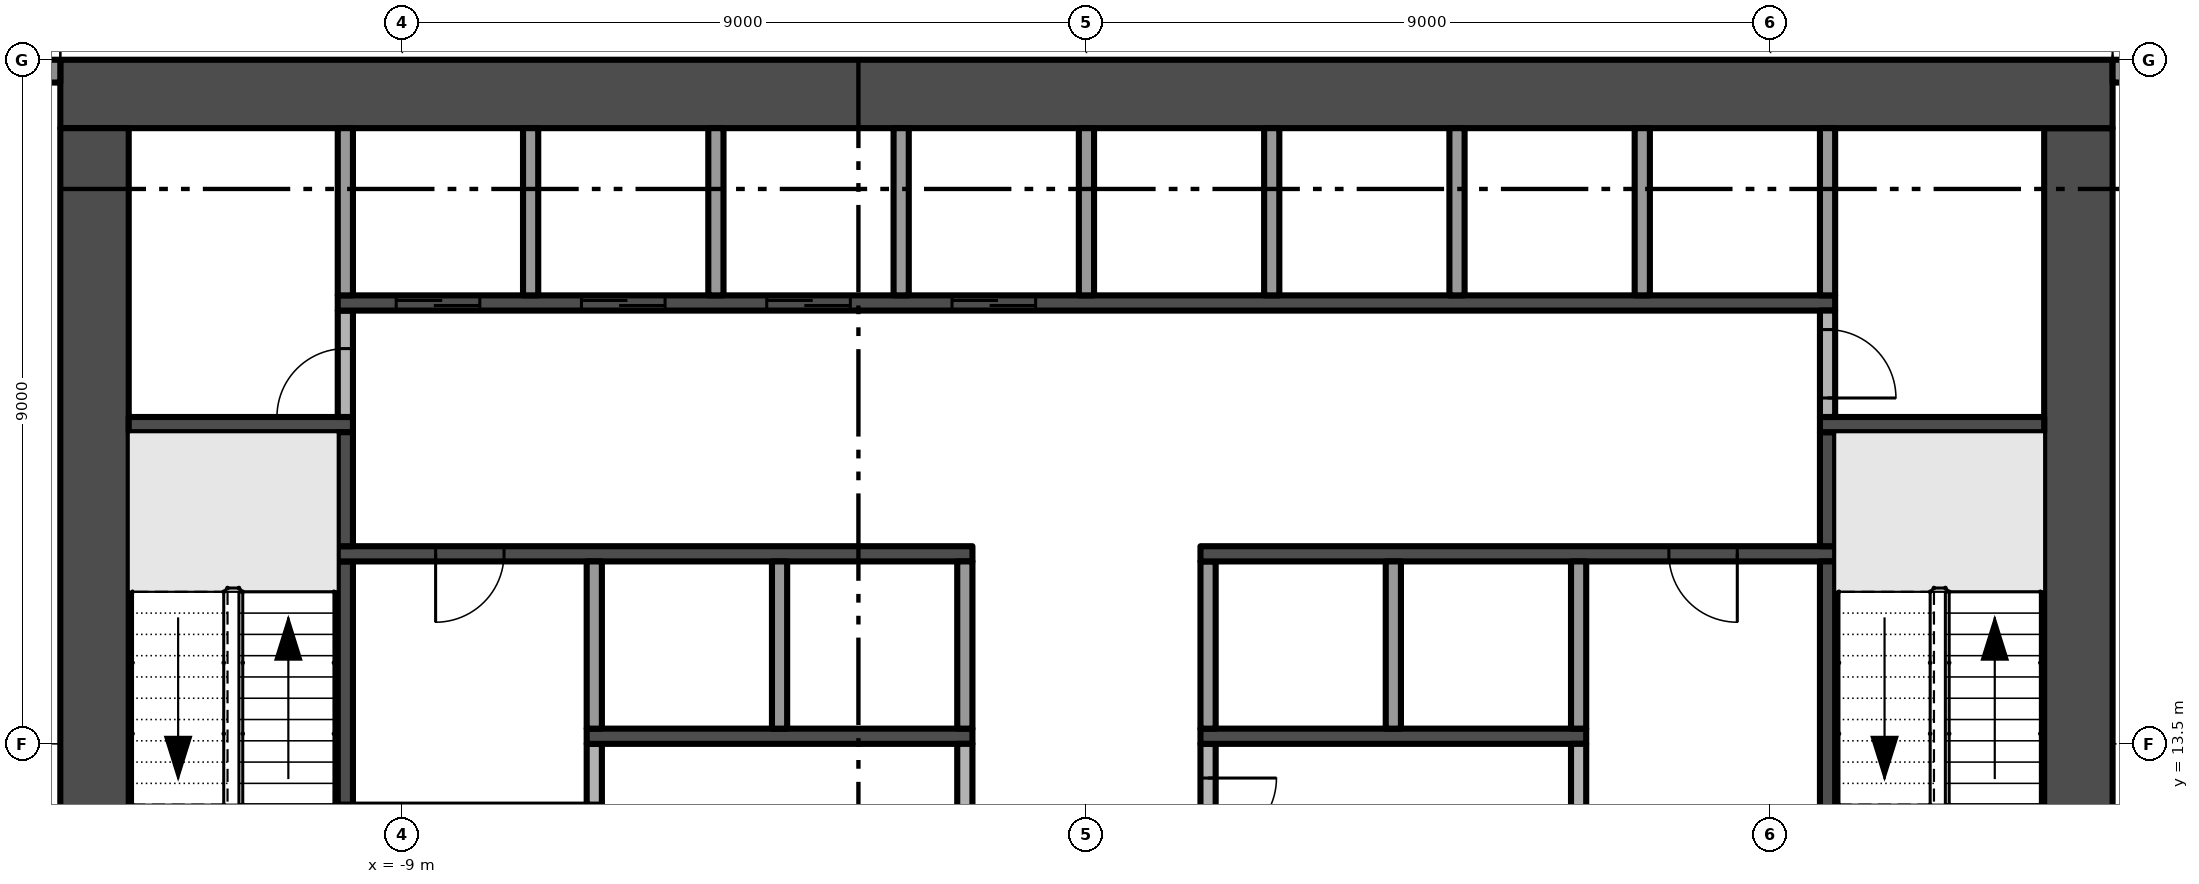
"""IFC4 building model, lengths in metres.
Left out: names, types, materials, properties, quantities, classifications, styles, units other than length and angle.
Written with IfcOpenShell. Run it as: python <this file> out.ifc"""

import sys

from ifc_helpers import new_model, si_unit, direction, frame, frame_2d, origin, place, context, subcontext, project, spatial, rectangle, extrude, element, fill, save


model = new_model("IFC4")
c1 = context("Model", 3, precision=1e-05, world=origin(), true_north=direction((0.0, 1.0)))
c2 = subcontext(c1, "Body", "Model", "MODEL_VIEW")
j1 = project(units=[si_unit("LENGTHUNIT", "METRE"), si_unit("PLANEANGLEUNIT", "RADIAN")], contexts=[c1])
p1 = place(None, origin())
s1 = spatial("IfcSite", under=j1, at=p1, CompositionType="ELEMENT")
p2 = place(p1, origin())
s2 = spatial("IfcBuilding", under=s1, at=p2, CompositionType="ELEMENT")
p3 = place(p2, frame((0.0, 0.0, 18.8)))
s3 = spatial("IfcBuildingStorey", under=s2, at=p3, CompositionType="ELEMENT", Elevation=18.8)
p4 = place(p3, frame((13.05, 5.4, -0.3), z_axis=(0.0, 0.0, 1.0), x_axis=(0.0, 1.0, 0.0)))
e1 = element("IfcWall", 1, at=p4, inside=s3, PredefinedType="SHEAR", context=c2, shape_type="SweptSolid", body=[
    extrude(rectangle(XDim=16.2, YDim=0.9, at=frame_2d((8.1, 0.0))), origin(), (0.0, 0.0, 1.0), 3.8),
])
p5 = place(p4, frame((6.0, 0.0, 0.3)))
e2 = element("IfcOpeningElement", 2, at=p5, cuts=e1, PredefinedType="OPENING", context=c2, shape_type="SweptSolid", body=[
    extrude(rectangle(XDim=1.2, YDim=2.2, at=frame_2d((0.6, 1.1))), frame((0.0, 0.46, 0.0), z_axis=(0.0, -1.0, 0.0), x_axis=(1.0, 0.0, 0.0)), (0.0, 0.0, 1.0), 0.92),
])
p6 = place(p3, frame((13.5, 22.05, -0.3), z_axis=(0.0, 0.0, 1.0), x_axis=(-1.0, 0.0, 0.0)))
e3 = element("IfcWall", 3, at=p6, inside=s3, PredefinedType="SHEAR", context=c2, shape_type="SweptSolid", body=[
    extrude(rectangle(XDim=27.0, YDim=0.9, at=frame_2d((13.5, 0.0))), origin(), (0.0, 0.0, 1.0), 3.8),
])
p7 = place(p3, frame((-13.05, 21.6, -0.3), z_axis=(0.0, 0.0, 1.0), x_axis=(0.0, -1.0, 0.0)))
e4 = element("IfcWall", 4, at=p7, inside=s3, PredefinedType="SHEAR", context=c2, shape_type="SweptSolid", body=[
    extrude(rectangle(XDim=16.2, YDim=0.9, at=frame_2d((8.1, 0.0))), origin(), (0.0, 0.0, 1.0), 3.8),
])
p8 = place(p7, frame((9.0, 0.0, 0.3)))
e5 = element("IfcOpeningElement", 5, at=p8, cuts=e4, PredefinedType="OPENING", context=c2, shape_type="SweptSolid", body=[
    extrude(rectangle(XDim=1.2, YDim=2.2, at=frame_2d((0.6, 1.1))), frame((0.0, 0.46, 0.0), z_axis=(0.0, -1.0, 0.0), x_axis=(1.0, 0.0, 0.0)), (0.0, 0.0, 1.0), 0.92),
])
p9 = place(p3, frame((13.5, 22.35, 0.0), z_axis=(0.0, 0.0, 1.0), x_axis=(1.0, 0.0, 0.0)))
e6 = element("IfcWall", 6, at=p9, inside=s3, PredefinedType="SOLIDWALL", context=c2, shape_type="SweptSolid", body=[
    extrude(rectangle(XDim=3.75, YDim=0.3, at=frame_2d((1.875, 0.0))), origin(), (0.0, 0.0, 1.0), 3.5),
])
p10 = place(p9, frame((0.85, 0.0, 0.45)))
e7 = element("IfcOpeningElement", 7, at=p10, cuts=e6, PredefinedType="OPENING", context=c2, shape_type="SweptSolid", body=[
    extrude(rectangle(XDim=2.6, YDim=2.65, at=frame_2d((1.3, 1.325))), frame((0.0, 0.16, 0.0), z_axis=(0.0, -1.0, 0.0), x_axis=(1.0, 0.0, 0.0)), (0.0, 0.0, 1.0), 0.32),
])
p11 = place(p3, frame((-17.25, 22.35, 0.0), z_axis=(0.0, 0.0, 1.0), x_axis=(1.0, 0.0, 0.0)))
e8 = element("IfcWall", 8, at=p11, inside=s3, PredefinedType="SOLIDWALL", context=c2, shape_type="SweptSolid", body=[
    extrude(rectangle(XDim=3.75, YDim=0.3, at=frame_2d((1.875, 0.0))), origin(), (0.0, 0.0, 1.0), 3.5),
])
p12 = place(p11, frame((0.3, 0.0, 0.0)))
e9 = element("IfcOpeningElement", 9, at=p12, cuts=e8, PredefinedType="OPENING", context=c2, shape_type="SweptSolid", body=[
    extrude(rectangle(XDim=2.6, YDim=2.4, at=frame_2d((1.3, 1.2))), frame((0.0, 0.16, 0.0), z_axis=(0.0, -1.0, 0.0), x_axis=(1.0, 0.0, 0.0)), (0.0, 0.0, 1.0), 0.32),
])
p13 = place(p3, frame((-12.6, 17.7, 0.0), z_axis=(0.0, 0.0, 1.0), x_axis=(1.0, 0.0, 0.0)))
e10 = element("IfcWall", 10, at=p13, inside=s3, PredefinedType="SHEAR", context=c2, shape_type="SweptSolid", body=[
    extrude(rectangle(XDim=2.95, YDim=0.2, at=frame_2d((1.475, 0.0))), origin(), (0.0, 0.0, 1.0), 3.5),
])
p14 = place(p3, frame((-9.75, 12.7, 0.0), z_axis=(0.0, 0.0, 1.0), x_axis=(0.0, 1.0, 0.0)))
e11 = element("IfcWall", 11, at=p14, inside=s3, PredefinedType="SHEAR", context=c2, shape_type="SweptSolid", body=[
    extrude(rectangle(XDim=3.2, YDim=0.2, at=frame_2d((1.6, 0.0))), origin(), (0.0, 0.0, 1.0), 3.5),
])
p15 = place(p3, frame((-1.5, 16.0, 0.0), z_axis=(0.0, 0.0, 1.0), x_axis=(-1.0, 0.0, 0.0)))
e12 = element("IfcWall", 12, at=p15, inside=s3, PredefinedType="SHEAR", context=c2, shape_type="SweptSolid", body=[
    extrude(rectangle(XDim=8.35, YDim=0.2, at=frame_2d((4.175, 0.0))), origin(), (0.0, 0.0, 1.0), 3.5),
])
p16 = place(p15, frame((6.162, 0.0, 0.0)))
e13 = element("IfcOpeningElement", 13, at=p16, cuts=e12, PredefinedType="OPENING", context=c2, shape_type="SweptSolid", body=[
    extrude(rectangle(XDim=0.9, YDim=2.1, at=frame_2d((0.45, 1.05))), frame((0.0, 0.11, 0.0), z_axis=(0.0, -1.0, 0.0), x_axis=(1.0, 0.0, 0.0)), (0.0, 0.0, 1.0), 0.22),
])
p17 = place(p3, frame((-9.75, 16.1, 0.0), z_axis=(0.0, 0.0, 1.0), x_axis=(0.0, 1.0, 0.0)))
e14 = element("IfcWall", 14, at=p17, inside=s3, PredefinedType="SHEAR", context=c2, shape_type="SweptSolid", body=[
    extrude(rectangle(XDim=1.5, YDim=0.2, at=frame_2d((0.75, 0.0))), origin(), (0.0, 0.0, 1.0), 3.5),
])
p18 = place(p3, frame((-9.75, 17.8, 0.0), z_axis=(0.0, 0.0, 1.0), x_axis=(0.0, 1.0, 0.0)))
e15 = element("IfcWall", 15, at=p18, inside=s3, PredefinedType="PARTITIONING", context=c2, shape_type="SweptSolid", body=[
    extrude(rectangle(XDim=1.4, YDim=0.2, at=frame_2d((0.7, 0.0))), origin(), (0.0, 0.0, 1.0), 3.5),
])
p19 = place(p18, origin())
e16 = element("IfcOpeningElement", 16, at=p19, cuts=e15, PredefinedType="OPENING", context=c2, shape_type="SweptSolid", body=[
    extrude(rectangle(XDim=0.9, YDim=2.1, at=frame_2d((0.45, 1.05))), frame((0.0, 0.11, 0.0), z_axis=(0.0, -1.0, 0.0), x_axis=(1.0, 0.0, 0.0)), (0.0, 0.0, 1.0), 0.22),
])
p20 = place(p3, frame((-9.85, 19.3, 0.0), z_axis=(0.0, 0.0, 1.0), x_axis=(1.0, 0.0, 0.0)))
e17 = element("IfcWall", 17, at=p20, inside=s3, PredefinedType="SHEAR", context=c2, shape_type="SweptSolid", body=[
    extrude(rectangle(XDim=19.7, YDim=0.2, at=frame_2d((9.85, 0.0))), origin(), (0.0, 0.0, 1.0), 3.5),
])
p21 = place(p20, frame((0.769, 0.0, 0.0)))
e18 = element("IfcOpeningElement", 18, at=p21, cuts=e17, PredefinedType="OPENING", context=c2, shape_type="SweptSolid", body=[
    extrude(rectangle(XDim=1.1, YDim=2.1, at=frame_2d((0.55, 1.05))), frame((0.0, 0.11, 0.0), z_axis=(0.0, -1.0, 0.0), x_axis=(1.0, 0.0, 0.0)), (0.0, 0.0, 1.0), 0.22),
])
p22 = place(p20, frame((3.206, 0.0, 0.0)))
e19 = element("IfcOpeningElement", 19, at=p22, cuts=e17, PredefinedType="OPENING", context=c2, shape_type="SweptSolid", body=[
    extrude(rectangle(XDim=1.1, YDim=2.1, at=frame_2d((0.55, 1.05))), frame((0.0, 0.11, 0.0), z_axis=(0.0, -1.0, 0.0), x_axis=(1.0, 0.0, 0.0)), (0.0, 0.0, 1.0), 0.22),
])
p23 = place(p20, frame((5.644, 0.0, 0.0)))
e20 = element("IfcOpeningElement", 20, at=p23, cuts=e17, PredefinedType="OPENING", context=c2, shape_type="SweptSolid", body=[
    extrude(rectangle(XDim=1.1, YDim=2.1, at=frame_2d((0.55, 1.05))), frame((0.0, 0.11, 0.0), z_axis=(0.0, -1.0, 0.0), x_axis=(1.0, 0.0, 0.0)), (0.0, 0.0, 1.0), 0.22),
])
p24 = place(p20, frame((8.081, 0.0, 0.0)))
e21 = element("IfcOpeningElement", 21, at=p24, cuts=e17, PredefinedType="OPENING", context=c2, shape_type="SweptSolid", body=[
    extrude(rectangle(XDim=1.1, YDim=2.1, at=frame_2d((0.55, 1.05))), frame((0.0, 0.11, 0.0), z_axis=(0.0, -1.0, 0.0), x_axis=(1.0, 0.0, 0.0)), (0.0, 0.0, 1.0), 0.22),
])
for number, where, z_axis, x_axis in (
    (22, (-9.75, 19.4, 0.0), (0.0, 0.0, 1.0), (0.0, 1.0, 0.0)),
    (23, (-7.312, 19.4, 0.0), (0.0, 0.0, 1.0), (0.0, 1.0, 0.0)),
):
    element("IfcWall", number, at=place(p3, frame(where, z_axis=z_axis, x_axis=x_axis)), inside=s3, PredefinedType="PARTITIONING", context=c2, shape_type="SweptSolid", body=[
        extrude(rectangle(XDim=2.2, YDim=0.2, at=frame_2d((1.1, 0.0))), origin(), (0.0, 0.0, 1.0), 3.5),
    ])
p25 = place(p3, frame((-6.475, 12.7, 0.0), z_axis=(0.0, 0.0, 1.0), x_axis=(0.0, 1.0, 0.0)))
e24 = element("IfcWall", 24, at=p25, inside=s3, PredefinedType="PARTITIONING", context=c2, shape_type="SweptSolid", body=[
    extrude(rectangle(XDim=0.8, YDim=0.2, at=frame_2d((0.4, 0.0))), origin(), (0.0, 0.0, 1.0), 3.5),
])
p26 = place(p3, frame((-6.575, 13.6, 0.0), z_axis=(0.0, 0.0, 1.0), x_axis=(1.0, 0.0, 0.0)))
e25 = element("IfcWall", 25, at=p26, inside=s3, PredefinedType="SHEAR", context=c2, shape_type="SweptSolid", body=[
    extrude(rectangle(XDim=5.075, YDim=0.2, at=frame_2d((2.538, 0.0))), origin(), (0.0, 0.0, 1.0), 3.5),
])
for number, where, z_axis, x_axis in (
    (26, (-6.475, 13.7, 0.0), (0.0, 0.0, 1.0), (0.0, 1.0, 0.0)),
    (27, (-4.875, 19.4, 0.0), (0.0, 0.0, 1.0), (0.0, 1.0, 0.0)),
    (28, (-4.037, 13.7, 0.0), (0.0, 0.0, 1.0), (0.0, 1.0, 0.0)),
    (29, (-2.438, 19.4, 0.0), (0.0, 0.0, 1.0), (0.0, 1.0, 0.0)),
):
    element("IfcWall", number, at=place(p3, frame(where, z_axis=z_axis, x_axis=x_axis)), inside=s3, PredefinedType="PARTITIONING", context=c2, shape_type="SweptSolid", body=[
        extrude(rectangle(XDim=2.2, YDim=0.2, at=frame_2d((1.1, 0.0))), origin(), (0.0, 0.0, 1.0), 3.5),
    ])
p27 = place(p3, frame((-1.6, 10.5, 0.0), z_axis=(0.0, 0.0, 1.0), x_axis=(0.0, 1.0, 0.0)))
e30 = element("IfcWall", 30, at=p27, inside=s3, PredefinedType="PARTITIONING", context=c2, shape_type="SweptSolid", body=[
    extrude(rectangle(XDim=3.0, YDim=0.2, at=frame_2d((1.5, 0.0))), origin(), (0.0, 0.0, 1.0), 3.5),
])
p28 = place(p27, frame((1.05, 0.0, 0.0)))
e31 = element("IfcOpeningElement", 31, at=p28, cuts=e30, PredefinedType="OPENING", context=c2, shape_type="SweptSolid", body=[
    extrude(rectangle(XDim=0.9, YDim=2.1, at=frame_2d((0.45, 1.05))), frame((0.0, 0.11, 0.0), z_axis=(0.0, -1.0, 0.0), x_axis=(1.0, 0.0, 0.0)), (0.0, 0.0, 1.0), 0.22),
])
for number, where, z_axis, x_axis in (
    (32, (-1.6, 13.7, 0.0), (0.0, 0.0, 1.0), (0.0, 1.0, 0.0)),
    (33, (0.0, 19.4, 0.0), (0.0, 0.0, 1.0), (0.0, 1.0, 0.0)),
):
    element("IfcWall", number, at=place(p3, frame(where, z_axis=z_axis, x_axis=x_axis)), inside=s3, PredefinedType="PARTITIONING", context=c2, shape_type="SweptSolid", body=[
        extrude(rectangle(XDim=2.2, YDim=0.2, at=frame_2d((1.1, 0.0))), origin(), (0.0, 0.0, 1.0), 3.5),
    ])
p29 = place(p3, frame((1.6, 13.5, 0.0), z_axis=(0.0, 0.0, 1.0), x_axis=(0.0, -1.0, 0.0)))
e34 = element("IfcWall", 34, at=p29, inside=s3, PredefinedType="PARTITIONING", context=c2, shape_type="SweptSolid", body=[
    extrude(rectangle(XDim=1.8, YDim=0.2, at=frame_2d((0.9, 0.0))), origin(), (0.0, 0.0, 1.0), 3.5),
])
p30 = place(p29, frame((0.45, 0.0, 0.0)))
e35 = element("IfcOpeningElement", 35, at=p30, cuts=e34, PredefinedType="OPENING", context=c2, shape_type="SweptSolid", body=[
    extrude(rectangle(XDim=0.9, YDim=2.1, at=frame_2d((0.45, 1.05))), frame((0.0, 0.11, 0.0), z_axis=(0.0, -1.0, 0.0), x_axis=(1.0, 0.0, 0.0)), (0.0, 0.0, 1.0), 0.22),
])
p31 = place(p3, frame((1.5, 13.6, 0.0), z_axis=(0.0, 0.0, 1.0), x_axis=(1.0, 0.0, 0.0)))
e36 = element("IfcWall", 36, at=p31, inside=s3, PredefinedType="SHEAR", context=c2, shape_type="SweptSolid", body=[
    extrude(rectangle(XDim=5.075, YDim=0.2, at=frame_2d((2.538, 0.0))), origin(), (0.0, 0.0, 1.0), 3.5),
])
p32 = place(p3, frame((1.6, 13.7, 0.0), z_axis=(0.0, 0.0, 1.0), x_axis=(0.0, 1.0, 0.0)))
e37 = element("IfcWall", 37, at=p32, inside=s3, PredefinedType="PARTITIONING", context=c2, shape_type="SweptSolid", body=[
    extrude(rectangle(XDim=2.2, YDim=0.2, at=frame_2d((1.1, 0.0))), origin(), (0.0, 0.0, 1.0), 3.5),
])
p33 = place(p3, frame((9.85, 16.0, 0.0), z_axis=(0.0, 0.0, 1.0), x_axis=(-1.0, 0.0, 0.0)))
e38 = element("IfcWall", 38, at=p33, inside=s3, PredefinedType="SHEAR", context=c2, shape_type="SweptSolid", body=[
    extrude(rectangle(XDim=8.35, YDim=0.2, at=frame_2d((4.175, 0.0))), origin(), (0.0, 0.0, 1.0), 3.5),
])
p34 = place(p33, frame((1.288, 0.0, 0.0)))
e39 = element("IfcOpeningElement", 39, at=p34, cuts=e38, PredefinedType="OPENING", context=c2, shape_type="SweptSolid", body=[
    extrude(rectangle(XDim=0.9, YDim=2.1, at=frame_2d((0.45, 1.05))), frame((0.0, 0.11, 0.0), z_axis=(0.0, -1.0, 0.0), x_axis=(1.0, 0.0, 0.0)), (0.0, 0.0, 1.0), 0.22),
])
for number, where, z_axis, x_axis in (
    (40, (2.438, 19.4, 0.0), (0.0, 0.0, 1.0), (0.0, 1.0, 0.0)),
    (41, (4.037, 13.7, 0.0), (0.0, 0.0, 1.0), (0.0, 1.0, 0.0)),
    (42, (4.875, 19.4, 0.0), (0.0, 0.0, 1.0), (0.0, 1.0, 0.0)),
):
    element("IfcWall", number, at=place(p3, frame(where, z_axis=z_axis, x_axis=x_axis)), inside=s3, PredefinedType="PARTITIONING", context=c2, shape_type="SweptSolid", body=[
        extrude(rectangle(XDim=2.2, YDim=0.2, at=frame_2d((1.1, 0.0))), origin(), (0.0, 0.0, 1.0), 3.5),
    ])
p35 = place(p3, frame((6.475, 12.3, 0.0), z_axis=(0.0, 0.0, 1.0), x_axis=(0.0, 1.0, 0.0)))
e43 = element("IfcWall", 43, at=p35, inside=s3, PredefinedType="PARTITIONING", context=c2, shape_type="SweptSolid", body=[
    extrude(rectangle(XDim=1.2, YDim=0.2, at=frame_2d((0.6, 0.0))), origin(), (0.0, 0.0, 1.0), 3.5),
])
for number, where, z_axis, x_axis in (
    (44, (6.475, 13.7, 0.0), (0.0, 0.0, 1.0), (0.0, 1.0, 0.0)),
    (45, (7.312, 19.4, 0.0), (0.0, 0.0, 1.0), (0.0, 1.0, 0.0)),
):
    element("IfcWall", number, at=place(p3, frame(where, z_axis=z_axis, x_axis=x_axis)), inside=s3, PredefinedType="PARTITIONING", context=c2, shape_type="SweptSolid", body=[
        extrude(rectangle(XDim=2.2, YDim=0.2, at=frame_2d((1.1, 0.0))), origin(), (0.0, 0.0, 1.0), 3.5),
    ])
p36 = place(p3, frame((9.75, 12.3, 0.0), z_axis=(0.0, 0.0, 1.0), x_axis=(0.0, 1.0, 0.0)))
e46 = element("IfcWall", 46, at=p36, inside=s3, PredefinedType="SHEAR", context=c2, shape_type="SweptSolid", body=[
    extrude(rectangle(XDim=3.6, YDim=0.2, at=frame_2d((1.8, 0.0))), origin(), (0.0, 0.0, 1.0), 3.5),
])
p37 = place(p3, frame((9.75, 16.1, 0.0), z_axis=(0.0, 0.0, 1.0), x_axis=(0.0, 1.0, 0.0)))
e47 = element("IfcWall", 47, at=p37, inside=s3, PredefinedType="SHEAR", context=c2, shape_type="SweptSolid", body=[
    extrude(rectangle(XDim=1.5, YDim=0.2, at=frame_2d((0.75, 0.0))), origin(), (0.0, 0.0, 1.0), 3.5),
])
p38 = place(p3, frame((9.65, 17.7, 0.0), z_axis=(0.0, 0.0, 1.0), x_axis=(1.0, 0.0, 0.0)))
e48 = element("IfcWall", 48, at=p38, inside=s3, PredefinedType="SHEAR", context=c2, shape_type="SweptSolid", body=[
    extrude(rectangle(XDim=2.95, YDim=0.2, at=frame_2d((1.475, 0.0))), origin(), (0.0, 0.0, 1.0), 3.5),
])
p39 = place(p3, frame((9.75, 19.2, 0.0), z_axis=(0.0, 0.0, 1.0), x_axis=(0.0, -1.0, 0.0)))
e49 = element("IfcWall", 49, at=p39, inside=s3, PredefinedType="PARTITIONING", context=c2, shape_type="SweptSolid", body=[
    extrude(rectangle(XDim=1.4, YDim=0.2, at=frame_2d((0.7, 0.0))), origin(), (0.0, 0.0, 1.0), 3.5),
])
p40 = place(p39, frame((0.25, 0.0, 0.0)))
e50 = element("IfcOpeningElement", 50, at=p40, cuts=e49, PredefinedType="OPENING", context=c2, shape_type="SweptSolid", body=[
    extrude(rectangle(XDim=0.9, YDim=2.1, at=frame_2d((0.45, 1.05))), frame((0.0, 0.11, 0.0), z_axis=(0.0, -1.0, 0.0), x_axis=(1.0, 0.0, 0.0)), (0.0, 0.0, 1.0), 0.22),
])
p41 = place(p3, frame((9.75, 19.4, 0.0), z_axis=(0.0, 0.0, 1.0), x_axis=(0.0, 1.0, 0.0)))
e51 = element("IfcWall", 51, at=p41, inside=s3, PredefinedType="PARTITIONING", context=c2, shape_type="SweptSolid", body=[
    extrude(rectangle(XDim=2.2, YDim=0.2, at=frame_2d((1.1, 0.0))), origin(), (0.0, 0.0, 1.0), 3.5),
])
p42 = place(p21, origin())
e52 = element("IfcDoor", 52, at=p42, inside=s3, OperationType="SLIDING_TO_LEFT", PredefinedType="DOOR", context=c2, shape_type="SweptSolid", body=[
    extrude(rectangle(XDim=1.1, YDim=2.1, at=frame_2d((0.55, 1.05))), frame((0.0, 0.025, 0.0), z_axis=(0.0, -1.0, 0.0), x_axis=(1.0, 0.0, 0.0)), (0.0, 0.0, 1.0), 0.05),
])
fill(e18, e52)
p43 = place(p22, origin())
e53 = element("IfcDoor", 53, at=p43, inside=s3, OperationType="SLIDING_TO_LEFT", PredefinedType="DOOR", context=c2, shape_type="SweptSolid", body=[
    extrude(rectangle(XDim=1.1, YDim=2.1, at=frame_2d((0.55, 1.05))), frame((0.0, 0.025, 0.0), z_axis=(0.0, -1.0, 0.0), x_axis=(1.0, 0.0, 0.0)), (0.0, 0.0, 1.0), 0.05),
])
fill(e19, e53)
p44 = place(p23, origin())
e54 = element("IfcDoor", 54, at=p44, inside=s3, OperationType="SLIDING_TO_LEFT", PredefinedType="DOOR", context=c2, shape_type="SweptSolid", body=[
    extrude(rectangle(XDim=1.1, YDim=2.1, at=frame_2d((0.55, 1.05))), frame((0.0, 0.025, 0.0), z_axis=(0.0, -1.0, 0.0), x_axis=(1.0, 0.0, 0.0)), (0.0, 0.0, 1.0), 0.05),
])
fill(e20, e54)
p45 = place(p24, origin())
e55 = element("IfcDoor", 55, at=p45, inside=s3, OperationType="SLIDING_TO_LEFT", PredefinedType="DOOR", context=c2, shape_type="SweptSolid", body=[
    extrude(rectangle(XDim=1.1, YDim=2.1, at=frame_2d((0.55, 1.05))), frame((0.0, 0.025, 0.0), z_axis=(0.0, -1.0, 0.0), x_axis=(1.0, 0.0, 0.0)), (0.0, 0.0, 1.0), 0.05),
])
fill(e21, e55)
p46 = place(p16, origin())
e56 = element("IfcDoor", 56, at=p46, inside=s3, OperationType="SINGLE_SWING_RIGHT", PredefinedType="DOOR", context=c2, shape_type="SweptSolid", body=[
    extrude(rectangle(XDim=0.9, YDim=2.1, at=frame_2d((0.45, 1.05))), frame((0.0, 0.025, 0.0), z_axis=(0.0, -1.0, 0.0), x_axis=(1.0, 0.0, 0.0)), (0.0, 0.0, 1.0), 0.05),
])
fill(e13, e56)
p47 = place(p30, origin())
e57 = element("IfcDoor", 57, at=p47, inside=s3, OperationType="SINGLE_SWING_LEFT", PredefinedType="DOOR", context=c2, shape_type="SweptSolid", body=[
    extrude(rectangle(XDim=0.9, YDim=2.1, at=frame_2d((0.45, 1.05))), frame((0.0, 0.025, 0.0), z_axis=(0.0, -1.0, 0.0), x_axis=(1.0, 0.0, 0.0)), (0.0, 0.0, 1.0), 0.05),
])
fill(e35, e57)
p48 = place(p34, origin())
e58 = element("IfcDoor", 58, at=p48, inside=s3, OperationType="SINGLE_SWING_LEFT", PredefinedType="DOOR", context=c2, shape_type="SweptSolid", body=[
    extrude(rectangle(XDim=0.9, YDim=2.1, at=frame_2d((0.45, 1.05))), frame((0.0, 0.025, 0.0), z_axis=(0.0, -1.0, 0.0), x_axis=(1.0, 0.0, 0.0)), (0.0, 0.0, 1.0), 0.05),
])
fill(e39, e58)
p49 = place(p19, origin())
e59 = element("IfcDoor", 59, at=p49, inside=s3, OperationType="SINGLE_SWING_LEFT", PredefinedType="DOOR", context=c2, shape_type="SweptSolid", body=[
    extrude(rectangle(XDim=0.9, YDim=2.1, at=frame_2d((0.45, 1.05))), frame((0.0, 0.025, 0.0), z_axis=(0.0, -1.0, 0.0), x_axis=(1.0, 0.0, 0.0)), (0.0, 0.0, 1.0), 0.05),
])
fill(e16, e59)
p50 = place(p40, origin())
e60 = element("IfcDoor", 60, at=p50, inside=s3, OperationType="SINGLE_SWING_RIGHT", PredefinedType="DOOR", context=c2, shape_type="SweptSolid", body=[
    extrude(rectangle(XDim=0.9, YDim=2.1, at=frame_2d((0.45, 1.05))), frame((0.0, 0.025, 0.0), z_axis=(0.0, -1.0, 0.0), x_axis=(1.0, 0.0, 0.0)), (0.0, 0.0, 1.0), 0.05),
])
fill(e50, e60)
save(model, sys.argv[1])
